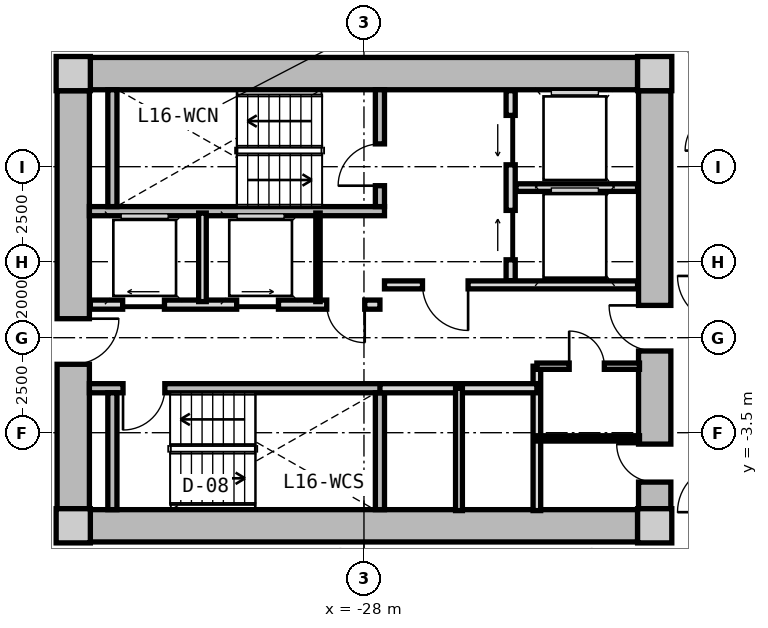
"""IFC4 building model, lengths in metres.
Left out: names, types, materials, properties, quantities, classifications, styles, units other than length and angle.
Written with IfcOpenShell. Run it as: python <this file> out.ifc"""

import sys

from ifc_helpers import new_model, si_unit, direction, frame, frame_2d, origin, origin_2d, place, context, subcontext, project, spatial, rectangle, extrude, source, transform, mapped, element, fill, save


model = new_model("IFC4")
c1 = context("Model", 3, precision=1e-05, world=origin(), true_north=direction((0.0, 1.0)))
c2 = subcontext(c1, "Body", "Model", "MODEL_VIEW")
j1 = project(units=[si_unit("LENGTHUNIT", "METRE"), si_unit("PLANEANGLEUNIT", "RADIAN")], contexts=[c1])
p1 = place(None, origin())
s1 = spatial("IfcSite", under=j1, at=p1, CompositionType="ELEMENT")
p2 = place(p1, origin())
s2 = spatial("IfcBuilding", under=s1, at=p2, CompositionType="ELEMENT")
p3 = place(p2, frame((0.0, 0.0, 55.15)))
s3 = spatial("IfcBuildingStorey", under=s2, at=p3, CompositionType="ELEMENT", Elevation=55.15)
m1 = source(origin(), c2, "Body", "SweptSolid", [
    extrude(rectangle(XDim=0.9, YDim=0.9, at=origin_2d()), origin(), (0.0, 0.0, 1.0), 3.05),
])
for number, where, z_axis, x_axis in (
    (1, (-35.65, -5.95, 0.0), (0.0, 0.0, 1.0), (1.0, 0.0, 0.0)),
    (2, (-20.35, -5.95, 0.0), (0.0, 0.0, 1.0), (1.0, 0.0, 0.0)),
    (3, (-20.35, 5.95, 0.0), (0.0, 0.0, 1.0), (1.0, 0.0, 0.0)),
    (4, (-35.65, 5.95, 0.0), (0.0, 0.0, 1.0), (1.0, 0.0, 0.0)),
):
    element("IfcColumn", number, at=place(p3, frame(where, z_axis=z_axis, x_axis=x_axis)), inside=s3, PredefinedType="COLUMN", context=c2, shape_type="MappedRepresentation", body=[
        mapped(m1, transform((0.0, 0.0, 0.0), x_axis=(1.0, 0.0, 0.0), y_axis=(0.0, 1.0, 0.0), z_axis=(0.0, 0.0, 1.0), scale=1.0)),
    ])
m2 = source(origin(), c2, "Body", "SweptSolid", [
    extrude(rectangle(XDim=14.4, YDim=0.85, at=frame_2d((7.2, 0.0))), origin(), (0.0, 0.0, 1.0), 2.79),
])
for number, where, z_axis, x_axis in (
    (5, (-35.2, 5.95, 0.0), (0.0, 0.0, 1.0), (1.0, 0.0, 0.0)),
    (6, (-20.8, -5.95, 0.0), (0.0, 0.0, 1.0), (-1.0, 0.0, 0.0)),
):
    element("IfcWall", number, at=place(p3, frame(where, z_axis=z_axis, x_axis=x_axis)), inside=s3, PredefinedType="SHEAR", context=c2, shape_type="MappedRepresentation", body=[
        mapped(m2, transform((0.0, 0.0, 0.0), x_axis=(1.0, 0.0, 0.0), y_axis=(0.0, 1.0, 0.0), z_axis=(0.0, 0.0, 1.0), scale=1.0)),
    ])
m3 = source(origin(), c2, "Body", "SweptSolid", [
    extrude(rectangle(XDim=11.0, YDim=0.85, at=frame_2d((5.5, 0.0))), origin(), (0.0, 0.0, 1.0), 2.79),
])
p4 = place(p3, frame((-35.65, -5.5, 0.0), z_axis=(0.0, 0.0, 1.0), x_axis=(0.0, 1.0, 0.0)))
e7 = element("IfcWall", 7, at=p4, inside=s3, PredefinedType="SHEAR", context=c2, shape_type="MappedRepresentation", body=[
    mapped(m3, transform((0.0, 0.0, 0.0), x_axis=(1.0, 0.0, 0.0), y_axis=(0.0, 1.0, 0.0), z_axis=(0.0, 0.0, 1.0), scale=1.0)),
])
p5 = place(p4, frame((3.8, 0.0, 0.0)))
e8 = element("IfcOpeningElement", 8, at=p5, cuts=e7, PredefinedType="OPENING", context=c2, shape_type="SweptSolid", body=[
    extrude(rectangle(XDim=1.2, YDim=2.15, at=frame_2d((0.6, 1.075))), frame((0.0, 0.435, 0.0), z_axis=(0.0, -1.0, 0.0), x_axis=(1.0, 0.0, 0.0)), (0.0, 0.0, 1.0), 0.87),
])
p6 = place(p3, frame((-20.35, 5.5, 0.0), z_axis=(0.0, 0.0, 1.0), x_axis=(0.0, -1.0, 0.0)))
e9 = element("IfcWall", 9, at=p6, inside=s3, PredefinedType="SHEAR", context=c2, shape_type="MappedRepresentation", body=[
    mapped(m3, transform((0.0, 0.0, 0.0), x_axis=(1.0, 0.0, 0.0), y_axis=(0.0, 1.0, 0.0), z_axis=(0.0, 0.0, 1.0), scale=1.0)),
])
p7 = place(p6, frame((5.65, 0.0, 0.0)))
e10 = element("IfcOpeningElement", 10, at=p7, cuts=e9, PredefinedType="OPENING", context=c2, shape_type="SweptSolid", body=[
    extrude(rectangle(XDim=1.2, YDim=2.15, at=frame_2d((0.6, 1.075))), frame((0.0, 0.435, 0.0), z_axis=(0.0, -1.0, 0.0), x_axis=(1.0, 0.0, 0.0)), (0.0, 0.0, 1.0), 0.87),
])
p8 = place(p6, frame((9.3, 0.0, 0.0)))
e11 = element("IfcOpeningElement", 11, at=p8, cuts=e9, PredefinedType="OPENING", context=c2, shape_type="SweptSolid", body=[
    extrude(rectangle(XDim=1.0, YDim=2.1, at=frame_2d((0.5, 1.05))), frame((0.0, 0.435, 0.0), z_axis=(0.0, -1.0, 0.0), x_axis=(1.0, 0.0, 0.0)), (0.0, 0.0, 1.0), 0.87),
])
m4 = source(origin(), c2, "Body", "SweptSolid", [
    extrude(rectangle(XDim=7.765, YDim=0.24, at=frame_2d((3.883, 0.0))), origin(), (0.0, 0.0, 1.0), 2.79),
])
p9 = place(p3, frame((-35.225, 2.33, 0.0), z_axis=(0.0, 0.0, 1.0), x_axis=(1.0, 0.0, 0.0)))
e12 = element("IfcWall", 12, at=p9, inside=s3, PredefinedType="PARTITIONING", context=c2, shape_type="MappedRepresentation", body=[
    mapped(m4, transform((0.0, 0.0, 0.0), x_axis=(1.0, 0.0, 0.0), y_axis=(0.0, 1.0, 0.0), z_axis=(0.0, 0.0, 1.0), scale=1.0)),
])
m5 = source(origin(), c2, "Body", "SweptSolid", [
    extrude(rectangle(XDim=3.075, YDim=0.24, at=frame_2d((1.538, 0.0))), origin(), (0.0, 0.0, 1.0), 2.79),
])
p10 = place(p3, frame((-34.62, 2.45, 0.0), z_axis=(0.0, 0.0, 1.0), x_axis=(0.0, 1.0, 0.0)))
e13 = element("IfcWall", 13, at=p10, inside=s3, PredefinedType="PARTITIONING", context=c2, shape_type="MappedRepresentation", body=[
    mapped(m5, transform((0.0, 0.0, 0.0), x_axis=(1.0, 0.0, 0.0), y_axis=(0.0, 1.0, 0.0), z_axis=(0.0, 0.0, 1.0), scale=1.0)),
])
p11 = place(p3, frame((-27.58, 2.45, 0.0), z_axis=(0.0, 0.0, 1.0), x_axis=(0.0, 1.0, 0.0)))
e14 = element("IfcWall", 14, at=p11, inside=s3, PredefinedType="PARTITIONING", context=c2, shape_type="MappedRepresentation", body=[
    mapped(m5, transform((0.0, 0.0, 0.0), x_axis=(1.0, 0.0, 0.0), y_axis=(0.0, 1.0, 0.0), z_axis=(0.0, 0.0, 1.0), scale=1.0)),
])
p12 = place(p11, frame((0.55, 0.0, 0.0)))
e15 = element("IfcOpeningElement", 15, at=p12, cuts=e14, PredefinedType="OPENING", context=c2, shape_type="SweptSolid", body=[
    extrude(rectangle(XDim=1.1, YDim=2.15, at=frame_2d((0.55, 1.075))), frame((0.0, 0.13, 0.0), z_axis=(0.0, -1.0, 0.0), x_axis=(1.0, 0.0, 0.0)), (0.0, 0.0, 1.0), 0.26),
])
p13 = place(p3, frame((-35.225, -2.33, 0.0), z_axis=(0.0, 0.0, 1.0), x_axis=(1.0, 0.0, 0.0)))
e16 = element("IfcWall", 16, at=p13, inside=s3, PredefinedType="PARTITIONING", context=c2, shape_type="MappedRepresentation", body=[
    mapped(m4, transform((0.0, 0.0, 0.0), x_axis=(1.0, 0.0, 0.0), y_axis=(0.0, 1.0, 0.0), z_axis=(0.0, 0.0, 1.0), scale=1.0)),
])
p14 = place(p13, frame((0.885, 0.0, 0.0)))
e17 = element("IfcOpeningElement", 17, at=p14, cuts=e16, PredefinedType="OPENING", context=c2, shape_type="SweptSolid", body=[
    extrude(rectangle(XDim=1.1, YDim=2.15, at=frame_2d((0.55, 1.075))), frame((0.0, 0.13, 0.0), z_axis=(0.0, -1.0, 0.0), x_axis=(1.0, 0.0, 0.0)), (0.0, 0.0, 1.0), 0.26),
])
for number, where, z_axis, x_axis in (
    (18, (-34.62, -5.525, 0.0), (0.0, 0.0, 1.0), (0.0, 1.0, 0.0)),
    (19, (-27.58, -5.525, 0.0), (0.0, 0.0, 1.0), (0.0, 1.0, 0.0)),
):
    element("IfcWall", number, at=place(p3, frame(where, z_axis=z_axis, x_axis=x_axis)), inside=s3, PredefinedType="PARTITIONING", context=c2, shape_type="MappedRepresentation", body=[
        mapped(m5, transform((0.0, 0.0, 0.0), x_axis=(1.0, 0.0, 0.0), y_axis=(0.0, 1.0, 0.0), z_axis=(0.0, 0.0, 1.0), scale=1.0)),
    ])
m6 = source(origin(), c2, "Body", "SweptSolid", [
    extrude(rectangle(XDim=5.0, YDim=0.24, at=frame_2d((2.5, 0.0))), origin(), (0.0, 0.0, 1.0), 2.775),
])
p15 = place(p3, frame((-24.14, 0.5, 0.0), z_axis=(0.0, 0.0, 1.0), x_axis=(0.0, 1.0, 0.0)))
e20 = element("IfcWall", 20, at=p15, inside=s3, PredefinedType="PARTITIONING", context=c2, shape_type="MappedRepresentation", body=[
    mapped(m6, transform((0.0, 0.0, 0.0), x_axis=(1.0, 0.0, 0.0), y_axis=(0.0, 1.0, 0.0), z_axis=(0.0, 0.0, 1.0), scale=1.0)),
])
p16 = place(p15, frame((3.05, 0.0, 0.0)))
e21 = element("IfcOpeningElement", 21, at=p16, cuts=e20, PredefinedType="OPENING", context=c2, shape_type="SweptSolid", body=[
    extrude(rectangle(XDim=1.3, YDim=2.2, at=frame_2d((0.65, 1.1))), frame((0.0, 0.13, 0.0), z_axis=(0.0, -1.0, 0.0), x_axis=(1.0, 0.0, 0.0)), (0.0, 0.0, 1.0), 0.26),
])
p17 = place(p15, frame((0.55, 0.0, 0.0)))
e22 = element("IfcOpeningElement", 22, at=p17, cuts=e20, PredefinedType="OPENING", context=c2, shape_type="SweptSolid", body=[
    extrude(rectangle(XDim=1.3, YDim=2.2, at=frame_2d((0.65, 1.1))), frame((0.0, 0.13, 0.0), z_axis=(0.0, -1.0, 0.0), x_axis=(1.0, 0.0, 0.0)), (0.0, 0.0, 1.0), 0.26),
])
m7 = source(origin(), c2, "Body", "SweptSolid", [
    extrude(rectangle(XDim=3.2, YDim=0.2, at=frame_2d((1.6, 0.0))), origin(), (0.0, 0.0, 1.0), 2.775),
])
p18 = place(p3, frame((-24.0, 2.95, 0.0), z_axis=(0.0, 0.0, 1.0), x_axis=(1.0, 0.0, 0.0)))
e23 = element("IfcWall", 23, at=p18, inside=s3, PredefinedType="PARTITIONING", context=c2, shape_type="MappedRepresentation", body=[
    mapped(m7, transform((0.0, 0.0, 0.0), x_axis=(1.0, 0.0, 0.0), y_axis=(0.0, 1.0, 0.0), z_axis=(0.0, 0.0, 1.0), scale=1.0)),
])
m8 = source(origin(), c2, "Body", "SweptSolid", [
    extrude(rectangle(XDim=6.66, YDim=0.21, at=frame_2d((3.33, 0.0))), origin(), (0.0, 0.0, 1.0), 2.775),
])
p19 = place(p3, frame((-27.46, 0.39, 0.0), z_axis=(0.0, 0.0, 1.0), x_axis=(1.0, 0.0, 0.0)))
e24 = element("IfcWall", 24, at=p19, inside=s3, PredefinedType="PARTITIONING", context=c2, shape_type="MappedRepresentation", body=[
    mapped(m8, transform((0.0, 0.0, 0.0), x_axis=(1.0, 0.0, 0.0), y_axis=(0.0, 1.0, 0.0), z_axis=(0.0, 0.0, 1.0), scale=1.0)),
])
p20 = place(p19, frame((1.0, 0.0, 0.0)))
e25 = element("IfcOpeningElement", 25, at=p20, cuts=e24, PredefinedType="OPENING", context=c2, shape_type="SweptSolid", body=[
    extrude(rectangle(XDim=1.2, YDim=2.15, at=frame_2d((0.6, 1.075))), frame((0.0, 0.115, 0.0), z_axis=(0.0, -1.0, 0.0), x_axis=(1.0, 0.0, 0.0)), (0.0, 0.0, 1.0), 0.23),
])
m9 = source(origin(), c2, "Body", "SweptSolid", [
    extrude(rectangle(XDim=7.62, YDim=0.24, at=frame_2d((3.81, 0.0))), origin(), (0.0, 0.0, 1.0), 2.775),
])
p21 = place(p3, frame((-35.2, -0.13, 0.0), z_axis=(0.0, 0.0, 1.0), x_axis=(1.0, 0.0, 0.0)))
e26 = element("IfcWall", 26, at=p21, inside=s3, PredefinedType="PARTITIONING", context=c2, shape_type="MappedRepresentation", body=[
    mapped(m9, transform((0.0, 0.0, 0.0), x_axis=(1.0, 0.0, 0.0), y_axis=(0.0, 1.0, 0.0), z_axis=(0.0, 0.0, 1.0), scale=1.0)),
])
p22 = place(p21, frame((6.22, 0.0, 0.0)))
e27 = element("IfcOpeningElement", 27, at=p22, cuts=e26, PredefinedType="OPENING", context=c2, shape_type="SweptSolid", body=[
    extrude(rectangle(XDim=1.0, YDim=2.1, at=frame_2d((0.5, 1.05))), frame((0.0, 0.13, 0.0), z_axis=(0.0, -1.0, 0.0), x_axis=(1.0, 0.0, 0.0)), (0.0, 0.0, 1.0), 0.26),
])
p23 = place(p21, frame((0.85, 0.0, 0.0)))
e28 = element("IfcOpeningElement", 28, at=p23, cuts=e26, PredefinedType="OPENING", context=c2, shape_type="SweptSolid", body=[
    extrude(rectangle(XDim=1.1, YDim=2.2, at=frame_2d((0.55, 1.1))), frame((0.0, 0.13, 0.0), z_axis=(0.0, -1.0, 0.0), x_axis=(1.0, 0.0, 0.0)), (0.0, 0.0, 1.0), 0.26),
])
p24 = place(p21, frame((3.85, 0.0, 0.0)))
e29 = element("IfcOpeningElement", 29, at=p24, cuts=e26, PredefinedType="OPENING", context=c2, shape_type="SweptSolid", body=[
    extrude(rectangle(XDim=1.1, YDim=2.2, at=frame_2d((0.55, 1.1))), frame((0.0, 0.13, 0.0), z_axis=(0.0, -1.0, 0.0), x_axis=(1.0, 0.0, 0.0)), (0.0, 0.0, 1.0), 0.26),
])
m10 = source(origin(), c2, "Body", "SweptSolid", [
    extrude(rectangle(XDim=2.33, YDim=0.115, at=frame_2d((1.165, 0.0))), origin(), (0.0, 0.0, 1.0), 2.775),
])
p25 = place(p3, frame((-29.21, -0.05, 0.0), z_axis=(0.0, 0.0, 1.0), x_axis=(0.0, 1.0, 0.0)))
e30 = element("IfcWall", 30, at=p25, inside=s3, PredefinedType="PARTITIONING", context=c2, shape_type="MappedRepresentation", body=[
    mapped(m10, transform((0.0, 0.0, 0.0), x_axis=(1.0, 0.0, 0.0), y_axis=(0.0, 1.0, 0.0), z_axis=(0.0, 0.0, 1.0), scale=1.0)),
])
m11 = source(origin(), c2, "Body", "SweptSolid", [
    extrude(rectangle(XDim=2.33, YDim=0.2, at=frame_2d((1.165, 0.0))), origin(), (0.0, 0.0, 1.0), 2.775),
])
p26 = place(p3, frame((-32.25, -0.05, 0.0), z_axis=(0.0, 0.0, 1.0), x_axis=(0.0, 1.0, 0.0)))
e31 = element("IfcWall", 31, at=p26, inside=s3, PredefinedType="PARTITIONING", context=c2, shape_type="MappedRepresentation", body=[
    mapped(m11, transform((0.0, 0.0, 0.0), x_axis=(1.0, 0.0, 0.0), y_axis=(0.0, 1.0, 0.0), z_axis=(0.0, 0.0, 1.0), scale=1.0)),
])
m12 = source(origin(), c2, "Body", "SweptSolid", [
    extrude(rectangle(XDim=3.8, YDim=0.2, at=frame_2d((1.9, 0.0))), origin(), (0.0, 0.0, 1.0), 2.775),
])
p27 = place(p3, frame((-23.45, -5.55, 0.0), z_axis=(0.0, 0.0, 1.0), x_axis=(0.0, 1.0, 0.0)))
e32 = element("IfcWall", 32, at=p27, inside=s3, PredefinedType="PARTITIONING", context=c2, shape_type="MappedRepresentation", body=[
    mapped(m12, transform((0.0, 0.0, 0.0), x_axis=(1.0, 0.0, 0.0), y_axis=(0.0, 1.0, 0.0), z_axis=(0.0, 0.0, 1.0), scale=1.0)),
])
m13 = source(origin(), c2, "Body", "SweptSolid", [
    extrude(rectangle(XDim=4.13, YDim=0.24, at=frame_2d((2.065, 0.0))), origin(), (0.0, 0.0, 1.0), 2.775),
])
p28 = place(p3, frame((-27.58, -2.33, 0.0), z_axis=(0.0, 0.0, 1.0), x_axis=(1.0, 0.0, 0.0)))
e33 = element("IfcWall", 33, at=p28, inside=s3, PredefinedType="PARTITIONING", context=c2, shape_type="MappedRepresentation", body=[
    mapped(m13, transform((0.0, 0.0, 0.0), x_axis=(1.0, 0.0, 0.0), y_axis=(0.0, 1.0, 0.0), z_axis=(0.0, 0.0, 1.0), scale=1.0)),
])
m14 = source(origin(), c2, "Body", "SweptSolid", [
    extrude(rectangle(XDim=3.22, YDim=0.18, at=frame_2d((1.61, 0.0))), origin(), (0.0, 0.0, 1.0), 2.775),
])
p29 = place(p3, frame((-25.5, -5.55, 0.0), z_axis=(0.0, 0.0, 1.0), x_axis=(0.0, 1.0, 0.0)))
e34 = element("IfcWall", 34, at=p29, inside=s3, PredefinedType="PARTITIONING", context=c2, shape_type="MappedRepresentation", body=[
    mapped(m14, transform((0.0, 0.0, 0.0), x_axis=(1.0, 0.0, 0.0), y_axis=(0.0, 1.0, 0.0), z_axis=(0.0, 0.0, 1.0), scale=1.0)),
])
m15 = source(origin(), c2, "Body", "SweptSolid", [
    extrude(rectangle(XDim=2.7, YDim=0.165, at=frame_2d((1.35, 0.0))), origin(), (0.0, 0.0, 1.0), 2.775),
])
p30 = place(p3, frame((-23.45, -1.75, 0.0), z_axis=(0.0, 0.0, 1.0), x_axis=(1.0, 0.0, 0.0)))
e35 = element("IfcWall", 35, at=p30, inside=s3, PredefinedType="PARTITIONING", context=c2, shape_type="MappedRepresentation", body=[
    mapped(m15, transform((0.0, 0.0, 0.0), x_axis=(1.0, 0.0, 0.0), y_axis=(0.0, 1.0, 0.0), z_axis=(0.0, 0.0, 1.0), scale=1.0)),
])
p31 = place(p30, frame((0.85, 0.0, 0.0)))
e36 = element("IfcOpeningElement", 36, at=p31, cuts=e35, PredefinedType="OPENING", context=c2, shape_type="SweptSolid", body=[
    extrude(rectangle(XDim=0.925, YDim=2.1, at=frame_2d((0.462, 1.05))), frame((0.0, 0.093, 0.0), z_axis=(0.0, -1.0, 0.0), x_axis=(1.0, 0.0, 0.0)), (0.0, 0.0, 1.0), 0.185),
])
m16 = source(origin(), c2, "Body", "SweptSolid", [
    extrude(rectangle(XDim=2.7, YDim=0.14, at=frame_2d((1.35, 0.0))), origin(), (0.0, 0.0, 1.0), 2.775),
])
p32 = place(p3, frame((-23.45, -3.65, 0.0), z_axis=(0.0, 0.0, 1.0), x_axis=(1.0, 0.0, 0.0)))
e37 = element("IfcWall", 37, at=p32, inside=s3, PredefinedType="PARTITIONING", context=c2, shape_type="MappedRepresentation", body=[
    mapped(m16, transform((0.0, 0.0, 0.0), x_axis=(1.0, 0.0, 0.0), y_axis=(0.0, 1.0, 0.0), z_axis=(0.0, 0.0, 1.0), scale=1.0)),
])
m17 = source(origin(), c2, "Body", "SweptSolid", [
    extrude(rectangle(XDim=1.1, YDim=2.15, at=frame_2d((0.55, 1.075))), frame((0.0, 0.025, 0.0), z_axis=(0.0, -1.0, 0.0), x_axis=(1.0, 0.0, 0.0)), (0.0, 0.0, 1.0), 0.05),
])
p33 = place(p12, origin())
e38 = element("IfcDoor", 38, at=p33, inside=s3, OperationType="SINGLE_SWING_LEFT", PredefinedType="DOOR", context=c2, shape_type="MappedRepresentation", body=[
    mapped(m17, transform((0.0, 0.0, 0.0), x_axis=(1.0, 0.0, 0.0), y_axis=(0.0, 1.0, 0.0), z_axis=(0.0, 0.0, 1.0), scale=1.0)),
])
fill(e15, e38)
p34 = place(p14, frame((1.1, 0.0, 0.0), z_axis=(0.0, 0.0, 1.0), x_axis=(-1.0, 0.0, 0.0)))
e39 = element("IfcDoor", 39, at=p34, inside=s3, OperationType="SINGLE_SWING_RIGHT", PredefinedType="DOOR", context=c2, shape_type="MappedRepresentation", body=[
    mapped(m17, transform((0.0, 0.0, 0.0), x_axis=(1.0, 0.0, 0.0), y_axis=(0.0, 1.0, 0.0), z_axis=(0.0, 0.0, 1.0), scale=1.0)),
])
fill(e17, e39)
m18 = source(origin(), c2, "Body", "SweptSolid", [
    extrude(rectangle(XDim=1.3, YDim=2.2, at=frame_2d((0.65, 1.1))), frame((0.0, 0.025, 0.0), z_axis=(0.0, -1.0, 0.0), x_axis=(1.0, 0.0, 0.0)), (0.0, 0.0, 1.0), 0.05),
])
p35 = place(p16, origin())
e40 = element("IfcDoor", 40, at=p35, inside=s3, OperationType="SLIDING_TO_LEFT", PredefinedType="DOOR", context=c2, shape_type="MappedRepresentation", body=[
    mapped(m18, transform((0.0, 0.0, 0.0), x_axis=(1.0, 0.0, 0.0), y_axis=(0.0, 1.0, 0.0), z_axis=(0.0, 0.0, 1.0), scale=1.0)),
])
fill(e21, e40)
p36 = place(p17, origin())
e41 = element("IfcDoor", 41, at=p36, inside=s3, OperationType="SLIDING_TO_RIGHT", PredefinedType="DOOR", context=c2, shape_type="MappedRepresentation", body=[
    mapped(m18, transform((0.0, 0.0, 0.0), x_axis=(1.0, 0.0, 0.0), y_axis=(0.0, 1.0, 0.0), z_axis=(0.0, 0.0, 1.0), scale=1.0)),
])
fill(e22, e41)
m19 = source(origin(), c2, "Body", "SweptSolid", [
    extrude(rectangle(XDim=1.2, YDim=2.15, at=frame_2d((0.6, 1.075))), frame((0.0, 0.025, 0.0), z_axis=(0.0, -1.0, 0.0), x_axis=(1.0, 0.0, 0.0)), (0.0, 0.0, 1.0), 0.05),
])
p37 = place(p20, frame((1.2, 0.0, 0.0), z_axis=(0.0, 0.0, 1.0), x_axis=(-1.0, 0.0, 0.0)))
e42 = element("IfcDoor", 42, at=p37, inside=s3, OperationType="SINGLE_SWING_LEFT", PredefinedType="DOOR", context=c2, shape_type="MappedRepresentation", body=[
    mapped(m19, transform((0.0, 0.0, 0.0), x_axis=(1.0, 0.0, 0.0), y_axis=(0.0, 1.0, 0.0), z_axis=(0.0, 0.0, 1.0), scale=1.0)),
])
fill(e25, e42)
p38 = place(p5, frame((1.2, 0.0, 0.0), z_axis=(0.0, 0.0, 1.0), x_axis=(-1.0, 0.0, 0.0)))
e43 = element("IfcDoor", 43, at=p38, inside=s3, OperationType="SINGLE_SWING_LEFT", PredefinedType="DOOR", context=c2, shape_type="MappedRepresentation", body=[
    mapped(m19, transform((0.0, 0.0, 0.0), x_axis=(1.0, 0.0, 0.0), y_axis=(0.0, 1.0, 0.0), z_axis=(0.0, 0.0, 1.0), scale=1.0)),
])
fill(e8, e43)
p39 = place(p7, frame((1.2, 0.0, 0.0), z_axis=(0.0, 0.0, 1.0), x_axis=(-1.0, 0.0, 0.0)))
e44 = element("IfcDoor", 44, at=p39, inside=s3, OperationType="SINGLE_SWING_RIGHT", PredefinedType="DOOR", context=c2, shape_type="MappedRepresentation", body=[
    mapped(m19, transform((0.0, 0.0, 0.0), x_axis=(1.0, 0.0, 0.0), y_axis=(0.0, 1.0, 0.0), z_axis=(0.0, 0.0, 1.0), scale=1.0)),
])
fill(e10, e44)
m20 = source(origin(), c2, "Body", "SweptSolid", [
    extrude(rectangle(XDim=1.0, YDim=2.1, at=frame_2d((0.5, 1.05))), frame((0.0, 0.025, 0.0), z_axis=(0.0, -1.0, 0.0), x_axis=(1.0, 0.0, 0.0)), (0.0, 0.0, 1.0), 0.05),
])
p40 = place(p22, frame((1.0, 0.0, 0.0), z_axis=(0.0, 0.0, 1.0), x_axis=(-1.0, 0.0, 0.0)))
e45 = element("IfcDoor", 45, at=p40, inside=s3, OperationType="SINGLE_SWING_LEFT", PredefinedType="DOOR", context=c2, shape_type="MappedRepresentation", body=[
    mapped(m20, transform((0.0, 0.0, 0.0), x_axis=(1.0, 0.0, 0.0), y_axis=(0.0, 1.0, 0.0), z_axis=(0.0, 0.0, 1.0), scale=1.0)),
])
fill(e27, e45)
m21 = source(origin(), c2, "Body", "SweptSolid", [
    extrude(rectangle(XDim=1.1, YDim=2.2, at=frame_2d((0.55, 1.1))), frame((0.0, 0.025, 0.0), z_axis=(0.0, -1.0, 0.0), x_axis=(1.0, 0.0, 0.0)), (0.0, 0.0, 1.0), 0.05),
])
p41 = place(p23, origin())
e46 = element("IfcDoor", 46, at=p41, inside=s3, OperationType="SLIDING_TO_LEFT", PredefinedType="DOOR", context=c2, shape_type="MappedRepresentation", body=[
    mapped(m21, transform((0.0, 0.0, 0.0), x_axis=(1.0, 0.0, 0.0), y_axis=(0.0, 1.0, 0.0), z_axis=(0.0, 0.0, 1.0), scale=1.0)),
])
fill(e28, e46)
p42 = place(p24, origin())
e47 = element("IfcDoor", 47, at=p42, inside=s3, OperationType="SLIDING_TO_RIGHT", PredefinedType="DOOR", context=c2, shape_type="MappedRepresentation", body=[
    mapped(m21, transform((0.0, 0.0, 0.0), x_axis=(1.0, 0.0, 0.0), y_axis=(0.0, 1.0, 0.0), z_axis=(0.0, 0.0, 1.0), scale=1.0)),
])
fill(e29, e47)
m22 = source(origin(), c2, "Body", "SweptSolid", [
    extrude(rectangle(XDim=0.925, YDim=2.1, at=frame_2d((0.462, 1.05))), frame((0.0, 0.025, 0.0), z_axis=(0.0, -1.0, 0.0), x_axis=(1.0, 0.0, 0.0)), (0.0, 0.0, 1.0), 0.05),
])
p43 = place(p31, origin())
e48 = element("IfcDoor", 48, at=p43, inside=s3, OperationType="SINGLE_SWING_LEFT", PredefinedType="DOOR", context=c2, shape_type="MappedRepresentation", body=[
    mapped(m22, transform((0.0, 0.0, 0.0), x_axis=(1.0, 0.0, 0.0), y_axis=(0.0, 1.0, 0.0), z_axis=(0.0, 0.0, 1.0), scale=1.0)),
])
fill(e36, e48)
p44 = place(p8, frame((1.0, 0.0, 0.0), z_axis=(0.0, 0.0, 1.0), x_axis=(-1.0, 0.0, 0.0)))
e49 = element("IfcDoor", 49, at=p44, inside=s3, OperationType="SINGLE_SWING_RIGHT", PredefinedType="DOOR", context=c2, shape_type="MappedRepresentation", body=[
    mapped(m20, transform((0.0, 0.0, 0.0), x_axis=(1.0, 0.0, 0.0), y_axis=(0.0, 1.0, 0.0), z_axis=(0.0, 0.0, 1.0), scale=1.0)),
])
fill(e11, e49)
save(model, sys.argv[1])
